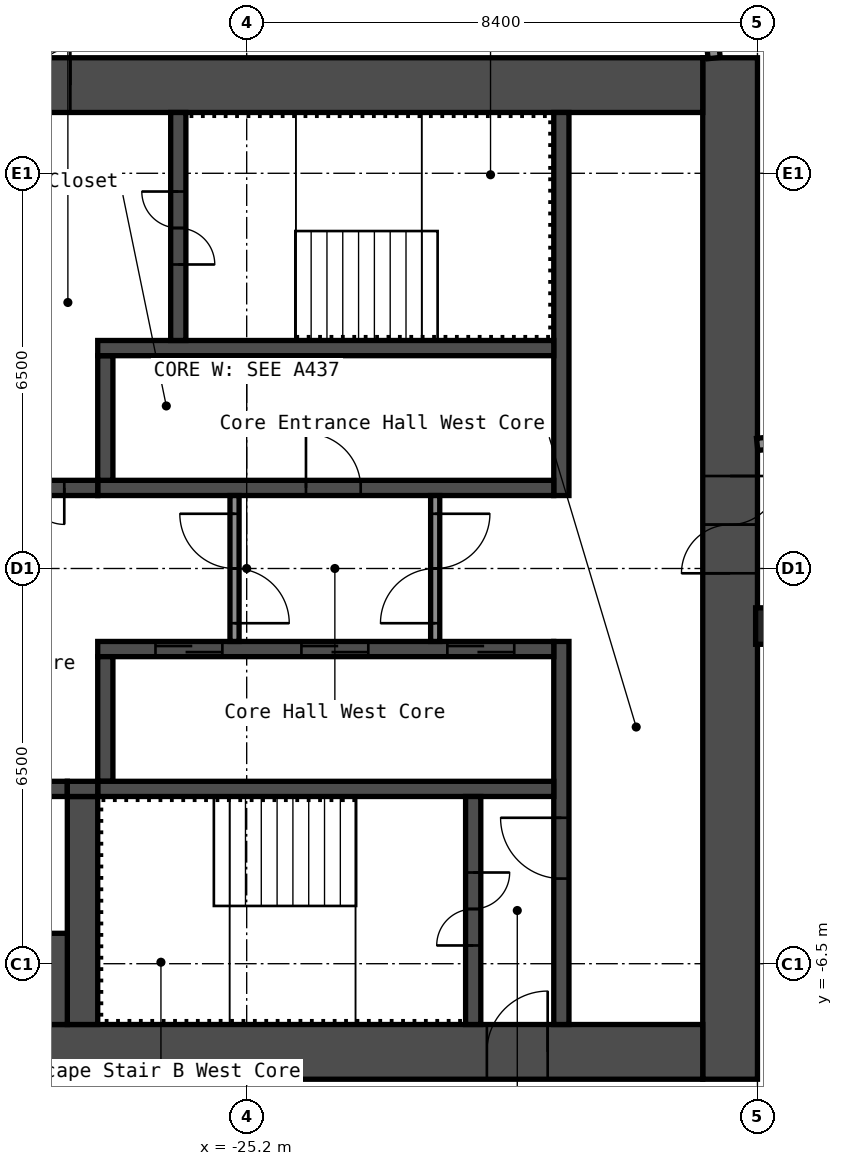
"""IFC4 building model, lengths in metres.
Left out: names, types, materials, properties, quantities, classifications, styles, units other than length and angle.
Written with IfcOpenShell. Run it as: python <this file> out.ifc"""

import sys

from ifc_helpers import new_model, si_unit, direction, frame, frame_2d, origin, origin_2d, place, context, subcontext, project, spatial, rectangle, hollow_rectangle, extrude, element, fill, save


model = new_model("IFC4")
c1 = context("Model", 3, precision=1e-05, world=origin(), true_north=direction((0.0, 1.0)))
c2 = subcontext(c1, "Body", "Model", "MODEL_VIEW")
j1 = project(units=[si_unit("LENGTHUNIT", "METRE"), si_unit("PLANEANGLEUNIT", "RADIAN")], contexts=[c1])
p1 = place(None, origin())
s1 = spatial("IfcSite", under=j1, at=p1, CompositionType="ELEMENT")
p2 = place(p1, origin())
s2 = spatial("IfcBuilding", under=s1, at=p2, CompositionType="ELEMENT")
p3 = place(p2, frame((0.0, 0.0, 258.2)))
s3 = spatial("IfcBuildingStorey", under=s2, at=p3, CompositionType="ELEMENT", Elevation=258.2)
p4 = place(p3, frame((-16.53, -0.947, 0.0), z_axis=(0.0, 0.0, 1.0), x_axis=(1.0, 0.0, 0.0)))
e1 = element("IfcColumn", 1, at=p4, inside=s3, PredefinedType="COLUMN", context=c2, shape_type="SweptSolid", body=[
    extrude(hollow_rectangle(XDim=0.6, YDim=0.6, WallThickness=0.025, InnerFilletRadius=0.038, OuterFilletRadius=0.062, at=origin_2d()), origin(), (0.0, 0.0, 1.0), 2.75),
])
p5 = place(p3, frame((-17.25, -8.4, 0.0), z_axis=(0.0, 0.0, 1.0), x_axis=(0.0, 1.0, 0.0)))
e2 = element("IfcWall", 2, at=p5, inside=s3, PredefinedType="SHEAR", context=c2, shape_type="SweptSolid", body=[
    extrude(rectangle(XDim=16.8, YDim=0.9, at=frame_2d((8.4, 0.0))), origin(), (0.0, 0.0, 1.0), 2.75),
])
p6 = place(p5, frame((8.321, 0.0, 0.0)))
e3 = element("IfcOpeningElement", 3, at=p6, cuts=e2, PredefinedType="OPENING", context=c2, shape_type="SweptSolid", body=[
    extrude(rectangle(XDim=1.6, YDim=2.1, at=frame_2d((0.8, 1.05))), frame((0.0, 0.46, 0.0), z_axis=(0.0, -1.0, 0.0), x_axis=(1.0, 0.0, 0.0)), (0.0, 0.0, 1.0), 0.92),
])
p7 = place(p3, frame((-32.7, 7.95, 0.0), z_axis=(0.0, 0.0, 1.0), x_axis=(1.0, 0.0, 0.0)))
e4 = element("IfcWall", 4, at=p7, inside=s3, PredefinedType="SHEAR", context=c2, shape_type="SweptSolid", body=[
    extrude(rectangle(XDim=15.0, YDim=0.9, at=frame_2d((7.5, 0.0))), origin(), (0.0, 0.0, 1.0), 2.75),
])
p8 = place(p7, frame((3.4, 0.0, 0.0)))
e5 = element("IfcOpeningElement", 5, at=p8, cuts=e4, PredefinedType="OPENING", context=c2, shape_type="SweptSolid", body=[
    extrude(rectangle(XDim=1.2, YDim=2.1, at=frame_2d((0.6, 1.05))), frame((0.0, 0.46, 0.0), z_axis=(0.0, -1.0, 0.0), x_axis=(1.0, 0.0, 0.0)), (0.0, 0.0, 1.0), 0.92),
])
p9 = place(p7, frame((0.75, 0.0, 0.0)))
e6 = element("IfcOpeningElement", 6, at=p9, cuts=e4, PredefinedType="OPENING", context=c2, shape_type="SweptSolid", body=[
    extrude(rectangle(XDim=0.9, YDim=2.1, at=frame_2d((0.45, 1.05))), frame((0.0, 0.46, 0.0), z_axis=(0.0, -1.0, 0.0), x_axis=(1.0, 0.0, 0.0)), (0.0, 0.0, 1.0), 0.92),
])
p10 = place(p3, frame((-32.7, -7.95, 0.0), z_axis=(0.0, 0.0, 1.0), x_axis=(1.0, 0.0, 0.0)))
e7 = element("IfcWall", 7, at=p10, inside=s3, PredefinedType="SHEAR", context=c2, shape_type="SweptSolid", body=[
    extrude(rectangle(XDim=15.0, YDim=0.9, at=frame_2d((7.5, 0.0))), origin(), (0.0, 0.0, 1.0), 2.75),
])
p11 = place(p10, frame((11.45, 0.0, 0.0)))
e8 = element("IfcOpeningElement", 8, at=p11, cuts=e7, PredefinedType="OPENING", context=c2, shape_type="SweptSolid", body=[
    extrude(rectangle(XDim=1.0, YDim=2.1, at=frame_2d((0.5, 1.05))), frame((0.0, 0.46, 0.0), z_axis=(0.0, -1.0, 0.0), x_axis=(1.0, 0.0, 0.0)), (0.0, 0.0, 1.0), 0.92),
])
p12 = place(p3, frame((-20.025, 1.2, 0.0), z_axis=(0.0, 0.0, 1.0), x_axis=(0.0, 1.0, 0.0)))
e9 = element("IfcWall", 9, at=p12, inside=s3, PredefinedType="SHEAR", context=c2, shape_type="SweptSolid", body=[
    extrude(rectangle(XDim=6.3, YDim=0.25, at=frame_2d((3.15, 0.0))), origin(), (0.0, 0.0, 1.0), 2.75),
])
p13 = place(p3, frame((-20.025, -7.5, 0.0), z_axis=(0.0, 0.0, 1.0), x_axis=(0.0, 1.0, 0.0)))
e10 = element("IfcWall", 10, at=p13, inside=s3, PredefinedType="SHEAR", context=c2, shape_type="SweptSolid", body=[
    extrude(rectangle(XDim=6.3, YDim=0.25, at=frame_2d((3.15, 0.0))), origin(), (0.0, 0.0, 1.0), 2.75),
])
p14 = place(p13, frame((2.4, 0.0, 0.0)))
e11 = element("IfcOpeningElement", 11, at=p14, cuts=e10, PredefinedType="OPENING", context=c2, shape_type="SweptSolid", body=[
    extrude(rectangle(XDim=1.0, YDim=2.1, at=frame_2d((0.5, 1.05))), frame((0.0, 0.135, 0.0), z_axis=(0.0, -1.0, 0.0), x_axis=(1.0, 0.0, 0.0)), (0.0, 0.0, 1.0), 0.27),
])
p15 = place(p3, frame((-27.65, 1.325, 0.0), z_axis=(0.0, 0.0, 1.0), x_axis=(1.0, 0.0, 0.0)))
e12 = element("IfcWall", 12, at=p15, inside=s3, PredefinedType="SHEAR", context=c2, shape_type="SweptSolid", body=[
    extrude(rectangle(XDim=7.5, YDim=0.25, at=frame_2d((3.75, 0.0))), origin(), (0.0, 0.0, 1.0), 2.75),
])
p16 = place(p15, frame((3.425, 0.0, 0.0)))
e13 = element("IfcOpeningElement", 13, at=p16, cuts=e12, PredefinedType="OPENING", context=c2, shape_type="SweptSolid", body=[
    extrude(rectangle(XDim=0.9, YDim=2.1, at=frame_2d((0.45, 1.05))), frame((0.0, 0.135, 0.0), z_axis=(0.0, -1.0, 0.0), x_axis=(1.0, 0.0, 0.0)), (0.0, 0.0, 1.0), 0.27),
])
p17 = place(p3, frame((-27.525, 1.45, 0.0), z_axis=(0.0, 0.0, 1.0), x_axis=(0.0, 1.0, 0.0)))
e14 = element("IfcWall", 14, at=p17, inside=s3, PredefinedType="SHEAR", context=c2, shape_type="SweptSolid", body=[
    extrude(rectangle(XDim=2.05, YDim=0.25, at=frame_2d((1.025, 0.0))), origin(), (0.0, 0.0, 1.0), 2.75),
])
p18 = place(p3, frame((-27.65, 3.625, 0.0), z_axis=(0.0, 0.0, 1.0), x_axis=(1.0, 0.0, 0.0)))
e15 = element("IfcWall", 15, at=p18, inside=s3, PredefinedType="SHEAR", context=c2, shape_type="SweptSolid", body=[
    extrude(rectangle(XDim=7.5, YDim=0.25, at=frame_2d((3.75, 0.0))), origin(), (0.0, 0.0, 1.0), 2.75),
])
p19 = place(p3, frame((-26.325, 3.75, 0.0), z_axis=(0.0, 0.0, 1.0), x_axis=(0.0, 1.0, 0.0)))
e16 = element("IfcWall", 16, at=p19, inside=s3, PredefinedType="SHEAR", context=c2, shape_type="SweptSolid", body=[
    extrude(rectangle(XDim=3.75, YDim=0.25, at=frame_2d((1.875, 0.0))), origin(), (0.0, 0.0, 1.0), 2.75),
])
p20 = place(p19, frame((1.25, 0.0, 0.0)))
e17 = element("IfcOpeningElement", 17, at=p20, cuts=e16, PredefinedType="OPENING", context=c2, shape_type="SweptSolid", body=[
    extrude(rectangle(XDim=1.2, YDim=2.1, at=frame_2d((0.6, 1.05))), frame((0.0, 0.135, 0.0), z_axis=(0.0, -1.0, 0.0), x_axis=(1.0, 0.0, 0.0)), (0.0, 0.0, 1.0), 0.27),
])
p21 = place(p3, frame((-32.7, 1.325, 0.0), z_axis=(0.0, 0.0, 1.0), x_axis=(1.0, 0.0, 0.0)))
e18 = element("IfcWall", 18, at=p21, inside=s3, PredefinedType="SHEAR", context=c2, shape_type="SweptSolid", body=[
    extrude(rectangle(XDim=5.05, YDim=0.25, at=frame_2d((2.525, 0.0))), origin(), (0.0, 0.0, 1.0), 2.75),
])
p22 = place(p21, frame((3.3, 0.0, 0.0)))
e19 = element("IfcOpeningElement", 19, at=p22, cuts=e18, PredefinedType="OPENING", context=c2, shape_type="SweptSolid", body=[
    extrude(rectangle(XDim=1.2, YDim=2.1, at=frame_2d((0.6, 1.05))), frame((0.0, 0.135, 0.0), z_axis=(0.0, -1.0, 0.0), x_axis=(1.0, 0.0, 0.0)), (0.0, 0.0, 1.0), 0.27),
])
p23 = place(p3, frame((-27.65, -1.325, 0.0), z_axis=(0.0, 0.0, 1.0), x_axis=(1.0, 0.0, 0.0)))
e20 = element("IfcWall", 20, at=p23, inside=s3, PredefinedType="SHEAR", context=c2, shape_type="SweptSolid", body=[
    extrude(rectangle(XDim=7.5, YDim=0.25, at=frame_2d((3.75, 0.0))), origin(), (0.0, 0.0, 1.0), 2.75),
])
p24 = place(p23, frame((5.75, 0.0, 0.0)))
e21 = element("IfcOpeningElement", 21, at=p24, cuts=e20, PredefinedType="OPENING", context=c2, shape_type="SweptSolid", body=[
    extrude(rectangle(XDim=1.1, YDim=2.1, at=frame_2d((0.55, 1.05))), frame((0.0, 0.135, 0.0), z_axis=(0.0, -1.0, 0.0), x_axis=(1.0, 0.0, 0.0)), (0.0, 0.0, 1.0), 0.27),
])
p25 = place(p23, frame((3.35, 0.0, 0.0)))
e22 = element("IfcOpeningElement", 22, at=p25, cuts=e20, PredefinedType="OPENING", context=c2, shape_type="SweptSolid", body=[
    extrude(rectangle(XDim=1.1, YDim=2.1, at=frame_2d((0.55, 1.05))), frame((0.0, 0.135, 0.0), z_axis=(0.0, -1.0, 0.0), x_axis=(1.0, 0.0, 0.0)), (0.0, 0.0, 1.0), 0.27),
])
p26 = place(p23, frame((0.95, 0.0, 0.0)))
e23 = element("IfcOpeningElement", 23, at=p26, cuts=e20, PredefinedType="OPENING", context=c2, shape_type="SweptSolid", body=[
    extrude(rectangle(XDim=1.1, YDim=2.1, at=frame_2d((0.55, 1.05))), frame((0.0, 0.135, 0.0), z_axis=(0.0, -1.0, 0.0), x_axis=(1.0, 0.0, 0.0)), (0.0, 0.0, 1.0), 0.27),
])
p27 = place(p3, frame((-27.525, -3.5, 0.0), z_axis=(0.0, 0.0, 1.0), x_axis=(0.0, 1.0, 0.0)))
e24 = element("IfcWall", 24, at=p27, inside=s3, PredefinedType="SHEAR", context=c2, shape_type="SweptSolid", body=[
    extrude(rectangle(XDim=2.05, YDim=0.25, at=frame_2d((1.025, 0.0))), origin(), (0.0, 0.0, 1.0), 2.75),
])
p28 = place(p3, frame((-27.65, -3.625, 0.0), z_axis=(0.0, 0.0, 1.0), x_axis=(1.0, 0.0, 0.0)))
e25 = element("IfcWall", 25, at=p28, inside=s3, PredefinedType="SHEAR", context=c2, shape_type="SweptSolid", body=[
    extrude(rectangle(XDim=7.5, YDim=0.25, at=frame_2d((3.75, 0.0))), origin(), (0.0, 0.0, 1.0), 2.75),
])
p29 = place(p3, frame((-21.475, -7.5, 0.0), z_axis=(0.0, 0.0, 1.0), x_axis=(0.0, 1.0, 0.0)))
e26 = element("IfcWall", 26, at=p29, inside=s3, PredefinedType="SHEAR", context=c2, shape_type="SweptSolid", body=[
    extrude(rectangle(XDim=3.75, YDim=0.25, at=frame_2d((1.875, 0.0))), origin(), (0.0, 0.0, 1.0), 2.75),
])
p30 = place(p29, frame((1.3, 0.0, 0.0)))
e27 = element("IfcOpeningElement", 27, at=p30, cuts=e26, PredefinedType="OPENING", context=c2, shape_type="SweptSolid", body=[
    extrude(rectangle(XDim=1.2, YDim=2.1, at=frame_2d((0.6, 1.05))), frame((0.0, 0.135, 0.0), z_axis=(0.0, -1.0, 0.0), x_axis=(1.0, 0.0, 0.0)), (0.0, 0.0, 1.0), 0.27),
])
p31 = place(p3, frame((-27.9, -7.5, 0.0), z_axis=(0.0, 0.0, 1.0), x_axis=(0.0, 1.0, 0.0)))
e28 = element("IfcWall", 28, at=p31, inside=s3, PredefinedType="SHEAR", context=c2, shape_type="SweptSolid", body=[
    extrude(rectangle(XDim=3.75, YDim=0.5, at=frame_2d((1.875, 0.0))), origin(), (0.0, 0.0, 1.0), 2.75),
])
p32 = place(p3, frame((-32.7, -3.625, 0.0), z_axis=(0.0, 0.0, 1.0), x_axis=(1.0, 0.0, 0.0)))
e29 = element("IfcWall", 29, at=p32, inside=s3, PredefinedType="SHEAR", context=c2, shape_type="SweptSolid", body=[
    extrude(rectangle(XDim=4.55, YDim=0.25, at=frame_2d((2.275, 0.0))), origin(), (0.0, 0.0, 1.0), 2.75),
])
p33 = place(p32, frame((2.85, 0.0, 0.0)))
e30 = element("IfcOpeningElement", 30, at=p33, cuts=e29, PredefinedType="OPENING", context=c2, shape_type="SweptSolid", body=[
    extrude(rectangle(XDim=1.1, YDim=2.1, at=frame_2d((0.55, 1.05))), frame((0.0, 0.135, 0.0), z_axis=(0.0, -1.0, 0.0), x_axis=(1.0, 0.0, 0.0)), (0.0, 0.0, 1.0), 0.27),
])
p34 = place(p32, frame((0.6, 0.0, 0.0)))
e31 = element("IfcOpeningElement", 31, at=p34, cuts=e29, PredefinedType="OPENING", context=c2, shape_type="SweptSolid", body=[
    extrude(rectangle(XDim=1.1, YDim=2.1, at=frame_2d((0.55, 1.05))), frame((0.0, 0.135, 0.0), z_axis=(0.0, -1.0, 0.0), x_axis=(1.0, 0.0, 0.0)), (0.0, 0.0, 1.0), 0.27),
])
p35 = place(p3, frame((-32.7, -6.75, 0.0), z_axis=(0.0, 0.0, 1.0), x_axis=(1.0, 0.0, 0.0)))
e32 = element("IfcWall", 32, at=p35, inside=s3, PredefinedType="SHEAR", context=c2, shape_type="SweptSolid", body=[
    extrude(rectangle(XDim=4.55, YDim=1.5, at=frame_2d((2.275, 0.0))), origin(), (0.0, 0.0, 1.0), 2.75),
])
p36 = place(p3, frame((-28.15, -3.625, 0.0), z_axis=(0.0, 0.0, 1.0), x_axis=(1.0, 0.0, 0.0)))
e33 = element("IfcWall", 33, at=p36, inside=s3, PredefinedType="SHEAR", context=c2, shape_type="SweptSolid", body=[
    extrude(rectangle(XDim=0.5, YDim=0.25, at=frame_2d((0.25, 0.0))), origin(), (0.0, 0.0, 1.0), 2.75),
])
p37 = place(p3, frame((-22.1, -1.2, 0.0), z_axis=(0.0, 0.0, 1.0), x_axis=(0.0, 1.0, 0.0)))
e34 = element("IfcWall", 34, at=p37, inside=s3, PredefinedType="PARTITIONING", context=c2, shape_type="SweptSolid", body=[
    extrude(rectangle(XDim=2.4, YDim=0.15, at=frame_2d((1.2, 0.0))), origin(), (0.0, 0.0, 1.0), 2.75),
])
p38 = place(p37, frame((0.3, 0.0, 0.0)))
e35 = element("IfcOpeningElement", 35, at=p38, cuts=e34, PredefinedType="OPENING", context=c2, shape_type="SweptSolid", body=[
    extrude(rectangle(XDim=1.8, YDim=2.1, at=frame_2d((0.9, 1.05))), frame((0.0, 0.085, 0.0), z_axis=(0.0, -1.0, 0.0), x_axis=(1.0, 0.0, 0.0)), (0.0, 0.0, 1.0), 0.17),
])
p39 = place(p3, frame((-25.4, -1.2, 0.0), z_axis=(0.0, 0.0, 1.0), x_axis=(0.0, 1.0, 0.0)))
e36 = element("IfcWall", 36, at=p39, inside=s3, PredefinedType="PARTITIONING", context=c2, shape_type="SweptSolid", body=[
    extrude(rectangle(XDim=2.4, YDim=0.15, at=frame_2d((1.2, 0.0))), origin(), (0.0, 0.0, 1.0), 2.75),
])
p40 = place(p39, frame((0.3, 0.0, 0.0)))
e37 = element("IfcOpeningElement", 37, at=p40, cuts=e36, PredefinedType="OPENING", context=c2, shape_type="SweptSolid", body=[
    extrude(rectangle(XDim=1.8, YDim=2.1, at=frame_2d((0.9, 1.05))), frame((0.0, 0.085, 0.0), z_axis=(0.0, -1.0, 0.0), x_axis=(1.0, 0.0, 0.0)), (0.0, 0.0, 1.0), 0.17),
])
p41 = place(p3, frame((-16.805, 2.041, 0.0), z_axis=(0.0, 0.0, 1.0), x_axis=(0.994521146831, 0.104535584879, 0.0)))
e38 = element("IfcWall", 38, at=p41, inside=s3, PredefinedType="PARTITIONING", context=c2, shape_type="SweptSolid", body=[
    extrude(rectangle(XDim=33.561, YDim=0.2, at=frame_2d((16.78, 0.0))), origin(), (0.0, 0.0, 1.0), 2.75),
])
p42 = place(p41, frame((1.276, 0.0, 0.0)))
e39 = element("IfcOpeningElement", 39, at=p42, cuts=e38, PredefinedType="OPENING", context=c2, shape_type="SweptSolid", body=[
    extrude(rectangle(XDim=0.9, YDim=2.1, at=frame_2d((0.45, 1.05))), frame((0.0, 0.11, 0.0), z_axis=(0.0, -1.0, 0.0), x_axis=(1.0, 0.0, 0.0)), (0.0, 0.0, 1.0), 0.22),
])
p43 = place(p41, frame((5.476, 0.0, 0.0)))
e40 = element("IfcOpeningElement", 40, at=p43, cuts=e38, PredefinedType="OPENING", context=c2, shape_type="SweptSolid", body=[
    extrude(rectangle(XDim=0.9, YDim=2.1, at=frame_2d((0.45, 1.05))), frame((0.0, 0.11, 0.0), z_axis=(0.0, -1.0, 0.0), x_axis=(1.0, 0.0, 0.0)), (0.0, 0.0, 1.0), 0.22),
])
p44 = place(p41, frame((11.211, 0.0, 0.0)))
e41 = element("IfcOpeningElement", 41, at=p44, cuts=e38, PredefinedType="OPENING", context=c2, shape_type="SweptSolid", body=[
    extrude(rectangle(XDim=1.0, YDim=2.1, at=frame_2d((0.5, 1.05))), frame((0.0, 0.11, 0.0), z_axis=(0.0, -1.0, 0.0), x_axis=(1.0, 0.0, 0.0)), (0.0, 0.0, 1.0), 0.22),
])
p45 = place(p41, frame((12.911, 0.0, 0.0)))
e42 = element("IfcOpeningElement", 42, at=p45, cuts=e38, PredefinedType="OPENING", context=c2, shape_type="SweptSolid", body=[
    extrude(rectangle(XDim=1.0, YDim=2.1, at=frame_2d((0.5, 1.05))), frame((0.0, 0.11, 0.0), z_axis=(0.0, -1.0, 0.0), x_axis=(1.0, 0.0, 0.0)), (0.0, 0.0, 1.0), 0.22),
])
p46 = place(p41, frame((18.831, 0.0, 0.0)))
e43 = element("IfcOpeningElement", 43, at=p46, cuts=e38, PredefinedType="OPENING", context=c2, shape_type="SweptSolid", body=[
    extrude(rectangle(XDim=0.9, YDim=2.1, at=frame_2d((0.45, 1.05))), frame((0.0, 0.11, 0.0), z_axis=(0.0, -1.0, 0.0), x_axis=(1.0, 0.0, 0.0)), (0.0, 0.0, 1.0), 0.22),
])
p47 = place(p41, frame((23.031, 0.0, 0.0)))
e44 = element("IfcOpeningElement", 44, at=p47, cuts=e38, PredefinedType="OPENING", context=c2, shape_type="SweptSolid", body=[
    extrude(rectangle(XDim=0.9, YDim=2.1, at=frame_2d((0.45, 1.05))), frame((0.0, 0.11, 0.0), z_axis=(0.0, -1.0, 0.0), x_axis=(1.0, 0.0, 0.0)), (0.0, 0.0, 1.0), 0.22),
])
p48 = place(p41, frame((26.641, 0.0, 0.0)))
e45 = element("IfcOpeningElement", 45, at=p48, cuts=e38, PredefinedType="OPENING", context=c2, shape_type="SweptSolid", body=[
    extrude(rectangle(XDim=0.9, YDim=2.1, at=frame_2d((0.45, 1.05))), frame((0.0, 0.11, 0.0), z_axis=(0.0, -1.0, 0.0), x_axis=(1.0, 0.0, 0.0)), (0.0, 0.0, 1.0), 0.22),
])
p49 = place(p41, frame((30.841, 0.0, 0.0)))
e46 = element("IfcOpeningElement", 46, at=p49, cuts=e38, PredefinedType="OPENING", context=c2, shape_type="SweptSolid", body=[
    extrude(rectangle(XDim=0.9, YDim=2.1, at=frame_2d((0.45, 1.05))), frame((0.0, 0.11, 0.0), z_axis=(0.0, -1.0, 0.0), x_axis=(1.0, 0.0, 0.0)), (0.0, 0.0, 1.0), 0.22),
])
p50 = place(p3, frame((-17.512, 8.395, 0.0), z_axis=(0.0, 0.0, 1.0), x_axis=(-0.104524714473, 0.994522289375, 0.0)))
e47 = element("IfcWall", 47, at=p50, inside=s3, PredefinedType="PARTITIONING", context=c2, shape_type="SweptSolid", body=[
    extrude(rectangle(XDim=9.607, YDim=0.2, at=frame_2d((4.803, 0.0))), origin(), (0.0, 0.0, 1.0), 2.75),
])
p51 = place(p6, origin())
e48 = element("IfcDoor", 48, at=p51, inside=s3, OperationType="DOUBLE_DOOR_SINGLE_SWING", PredefinedType="DOOR", context=c2, shape_type="SweptSolid", body=[
    extrude(rectangle(XDim=1.6, YDim=2.1, at=frame_2d((0.8, 1.05))), frame((0.0, 0.025, 0.0), z_axis=(0.0, -1.0, 0.0), x_axis=(1.0, 0.0, 0.0)), (0.0, 0.0, 1.0), 0.05),
])
fill(e3, e48)
p52 = place(p8, origin())
e49 = element("IfcDoor", 49, at=p52, inside=s3, OperationType="DOUBLE_DOOR_SINGLE_SWING", PredefinedType="DOOR", context=c2, shape_type="SweptSolid", body=[
    extrude(rectangle(XDim=1.2, YDim=2.1, at=frame_2d((0.6, 1.05))), frame((0.0, 0.025, 0.0), z_axis=(0.0, -1.0, 0.0), x_axis=(1.0, 0.0, 0.0)), (0.0, 0.0, 1.0), 0.05),
])
fill(e5, e49)
p53 = place(p11, origin())
e50 = element("IfcDoor", 50, at=p53, inside=s3, OperationType="SINGLE_SWING_LEFT", PredefinedType="DOOR", context=c2, shape_type="SweptSolid", body=[
    extrude(rectangle(XDim=1.0, YDim=2.1, at=frame_2d((0.5, 1.05))), frame((0.0, 0.025, 0.0), z_axis=(0.0, -1.0, 0.0), x_axis=(1.0, 0.0, 0.0)), (0.0, 0.0, 1.0), 0.05),
])
fill(e8, e50)
p54 = place(p20, origin())
e51 = element("IfcDoor", 51, at=p54, inside=s3, OperationType="DOUBLE_DOOR_SINGLE_SWING", PredefinedType="DOOR", context=c2, shape_type="SweptSolid", body=[
    extrude(rectangle(XDim=1.2, YDim=2.1, at=frame_2d((0.6, 1.05))), frame((0.0, 0.025, 0.0), z_axis=(0.0, -1.0, 0.0), x_axis=(1.0, 0.0, 0.0)), (0.0, 0.0, 1.0), 0.05),
])
fill(e17, e51)
p55 = place(p30, origin())
e52 = element("IfcDoor", 52, at=p55, inside=s3, OperationType="DOUBLE_DOOR_SINGLE_SWING", PredefinedType="DOOR", context=c2, shape_type="SweptSolid", body=[
    extrude(rectangle(XDim=1.2, YDim=2.1, at=frame_2d((0.6, 1.05))), frame((0.0, 0.025, 0.0), z_axis=(0.0, -1.0, 0.0), x_axis=(1.0, 0.0, 0.0)), (0.0, 0.0, 1.0), 0.05),
])
fill(e27, e52)
p56 = place(p14, origin())
e53 = element("IfcDoor", 53, at=p56, inside=s3, OperationType="SINGLE_SWING_LEFT", PredefinedType="DOOR", context=c2, shape_type="SweptSolid", body=[
    extrude(rectangle(XDim=1.0, YDim=2.1, at=frame_2d((0.5, 1.05))), frame((0.0, 0.025, 0.0), z_axis=(0.0, -1.0, 0.0), x_axis=(1.0, 0.0, 0.0)), (0.0, 0.0, 1.0), 0.05),
])
fill(e11, e53)
p57 = place(p22, origin())
e54 = element("IfcDoor", 54, at=p57, inside=s3, OperationType="DOUBLE_DOOR_SINGLE_SWING", PredefinedType="DOOR", context=c2, shape_type="SweptSolid", body=[
    extrude(rectangle(XDim=1.2, YDim=2.1, at=frame_2d((0.6, 1.05))), frame((0.0, 0.025, 0.0), z_axis=(0.0, -1.0, 0.0), x_axis=(1.0, 0.0, 0.0)), (0.0, 0.0, 1.0), 0.05),
])
fill(e19, e54)
p58 = place(p38, origin())
e55 = element("IfcDoor", 55, at=p58, inside=s3, OperationType="DOUBLE_DOOR_SINGLE_SWING", PredefinedType="DOOR", context=c2, shape_type="SweptSolid", body=[
    extrude(rectangle(XDim=1.8, YDim=2.1, at=frame_2d((0.9, 1.05))), frame((0.0, 0.025, 0.0), z_axis=(0.0, -1.0, 0.0), x_axis=(1.0, 0.0, 0.0)), (0.0, 0.0, 1.0), 0.05),
])
fill(e35, e55)
p59 = place(p40, origin())
e56 = element("IfcDoor", 56, at=p59, inside=s3, OperationType="DOUBLE_DOOR_SINGLE_SWING", PredefinedType="DOOR", context=c2, shape_type="SweptSolid", body=[
    extrude(rectangle(XDim=1.8, YDim=2.1, at=frame_2d((0.9, 1.05))), frame((0.0, 0.025, 0.0), z_axis=(0.0, -1.0, 0.0), x_axis=(1.0, 0.0, 0.0)), (0.0, 0.0, 1.0), 0.05),
])
fill(e37, e56)
p60 = place(p16, origin())
e57 = element("IfcDoor", 57, at=p60, inside=s3, OperationType="SINGLE_SWING_RIGHT", PredefinedType="DOOR", context=c2, shape_type="SweptSolid", body=[
    extrude(rectangle(XDim=0.9, YDim=2.1, at=frame_2d((0.45, 1.05))), frame((0.0, 0.025, 0.0), z_axis=(0.0, -1.0, 0.0), x_axis=(1.0, 0.0, 0.0)), (0.0, 0.0, 1.0), 0.05),
])
fill(e13, e57)
p61 = place(p24, origin())
e58 = element("IfcDoor", 58, at=p61, inside=s3, OperationType="DOUBLE_DOOR_SLIDING", PredefinedType="DOOR", context=c2, shape_type="SweptSolid", body=[
    extrude(rectangle(XDim=1.1, YDim=2.1, at=frame_2d((0.55, 1.05))), frame((0.0, 0.025, 0.0), z_axis=(0.0, -1.0, 0.0), x_axis=(1.0, 0.0, 0.0)), (0.0, 0.0, 1.0), 0.05),
])
fill(e21, e58)
p62 = place(p25, origin())
e59 = element("IfcDoor", 59, at=p62, inside=s3, OperationType="DOUBLE_DOOR_SLIDING", PredefinedType="DOOR", context=c2, shape_type="SweptSolid", body=[
    extrude(rectangle(XDim=1.1, YDim=2.1, at=frame_2d((0.55, 1.05))), frame((0.0, 0.025, 0.0), z_axis=(0.0, -1.0, 0.0), x_axis=(1.0, 0.0, 0.0)), (0.0, 0.0, 1.0), 0.05),
])
fill(e22, e59)
p63 = place(p26, origin())
e60 = element("IfcDoor", 60, at=p63, inside=s3, OperationType="DOUBLE_DOOR_SLIDING", PredefinedType="DOOR", context=c2, shape_type="SweptSolid", body=[
    extrude(rectangle(XDim=1.1, YDim=2.1, at=frame_2d((0.55, 1.05))), frame((0.0, 0.025, 0.0), z_axis=(0.0, -1.0, 0.0), x_axis=(1.0, 0.0, 0.0)), (0.0, 0.0, 1.0), 0.05),
])
fill(e23, e60)
save(model, sys.argv[1])
